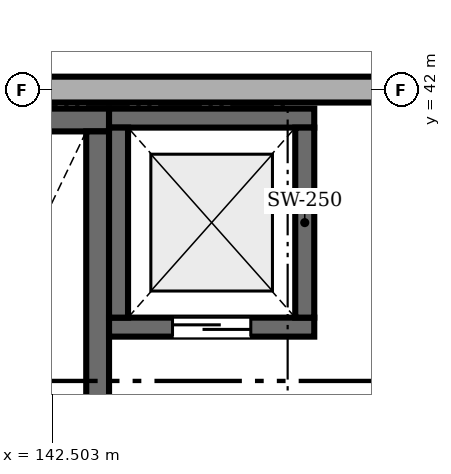
"""IFC4 building model, lengths in metres.
Left out: names, types, materials, properties, quantities, classifications, styles, units other than length and angle.
Written with IfcOpenShell. Run it as: python <this file> out.ifc"""

import sys

from ifc_helpers import new_model, si_unit, direction, frame, frame_2d, origin, place, context, subcontext, project, spatial, rectangle, extrude, element, fill, save


model = new_model("IFC4")
c1 = context("Model", 3, precision=1e-05, world=origin(), true_north=direction((0.0, 1.0)))
c2 = subcontext(c1, "Body", "Model", "MODEL_VIEW")
j1 = project(units=[si_unit("LENGTHUNIT", "METRE"), si_unit("PLANEANGLEUNIT", "RADIAN")], contexts=[c1])
p1 = place(None, origin())
s1 = spatial("IfcSite", under=j1, at=p1, CompositionType="ELEMENT")
p2 = place(p1, origin())
s2 = spatial("IfcBuilding", under=s1, at=p2, CompositionType="ELEMENT")
p3 = place(p2, frame((0.0, 0.0, 5.4)))
s3 = spatial("IfcBuildingStorey", under=s2, at=p3, CompositionType="ELEMENT", Elevation=5.4)
p4 = place(p3, frame((139.2, 41.6, 0.0), z_axis=(0.0, 0.0, 1.0), x_axis=(1.0, 0.0, 0.0)))
e1 = element("IfcWall", 1, at=p4, inside=s3, PredefinedType="SHEAR", context=c2, shape_type="SweptSolid", body=[
    extrude(rectangle(XDim=4.05, YDim=0.3, at=frame_2d((2.025, 0.0))), origin(), (0.0, 0.0, 1.0), 4.6),
])
p5 = place(p3, frame((143.1, 33.55, 0.0), z_axis=(0.0, 0.0, 1.0), x_axis=(0.0, 1.0, 0.0)))
e2 = element("IfcWall", 2, at=p5, inside=s3, PredefinedType="SHEAR", context=c2, shape_type="SweptSolid", body=[
    extrude(rectangle(XDim=7.9, YDim=0.3, at=frame_2d((3.95, 0.0))), origin(), (0.0, 0.0, 1.0), 4.6),
])
p6 = place(p3, frame((143.25, 38.875, 0.0), z_axis=(0.0, 0.0, 1.0), x_axis=(1.0, 0.0, 0.0)))
e3 = element("IfcWall", 3, at=p6, inside=s3, PredefinedType="SHEAR", context=c2, shape_type="SweptSolid", body=[
    extrude(rectangle(XDim=2.7, YDim=0.25, at=frame_2d((1.35, 0.0))), origin(), (0.0, 0.0, 1.0), 4.6),
])
p7 = place(p6, frame((0.835, 0.0, 0.0)))
e4 = element("IfcOpeningElement", 4, at=p7, cuts=e3, PredefinedType="OPENING", context=c2, shape_type="SweptSolid", body=[
    extrude(rectangle(XDim=1.03, YDim=2.15, at=frame_2d((0.515, 1.075))), frame((0.0, 0.135, 0.0), z_axis=(0.0, -1.0, 0.0), x_axis=(1.0, 0.0, 0.0)), (0.0, 0.0, 1.0), 0.27),
])
p8 = place(p3, frame((143.25, 41.625, 0.0), z_axis=(0.0, 0.0, 1.0), x_axis=(1.0, 0.0, 0.0)))
e5 = element("IfcWall", 5, at=p8, inside=s3, PredefinedType="SHEAR", context=c2, shape_type="SweptSolid", body=[
    extrude(rectangle(XDim=2.7, YDim=0.25, at=frame_2d((1.35, 0.0))), origin(), (0.0, 0.0, 1.0), 4.6),
])
for number, where, z_axis, x_axis in (
    (6, (143.375, 39.0, 0.0), (0.0, 0.0, 1.0), (0.0, 1.0, 0.0)),
    (7, (145.825, 39.0, 0.0), (0.0, 0.0, 1.0), (0.0, 1.0, 0.0)),
):
    element("IfcWall", number, at=place(p3, frame(where, z_axis=z_axis, x_axis=x_axis)), inside=s3, PredefinedType="SHEAR", context=c2, shape_type="SweptSolid", body=[
        extrude(rectangle(XDim=2.5, YDim=0.25, at=frame_2d((1.25, 0.0))), origin(), (0.0, 0.0, 1.0), 4.6),
    ])
p9 = place(p3, frame((139.2, 42.0, 0.0), z_axis=(0.0, 0.0, 1.0), x_axis=(1.0, 0.0, 0.0)))
e8 = element("IfcWall", 8, at=p9, inside=s3, PredefinedType="STANDARD", context=c2, shape_type="SweptSolid", body=[
    extrude(rectangle(XDim=7.6, YDim=0.34, at=frame_2d((3.8, 0.0))), origin(), (0.0, 0.0, 1.0), 3.85),
])
p10 = place(p7, origin())
e9 = element("IfcDoor", 9, at=p10, inside=s3, OperationType="SLIDING_TO_LEFT", PredefinedType="DOOR", context=c2, shape_type="SweptSolid", body=[
    extrude(rectangle(XDim=1.03, YDim=2.15, at=frame_2d((0.515, 1.075))), frame((0.0, 0.025, 0.0), z_axis=(0.0, -1.0, 0.0), x_axis=(1.0, 0.0, 0.0)), (0.0, 0.0, 1.0), 0.05),
])
fill(e4, e9)
save(model, sys.argv[1])
